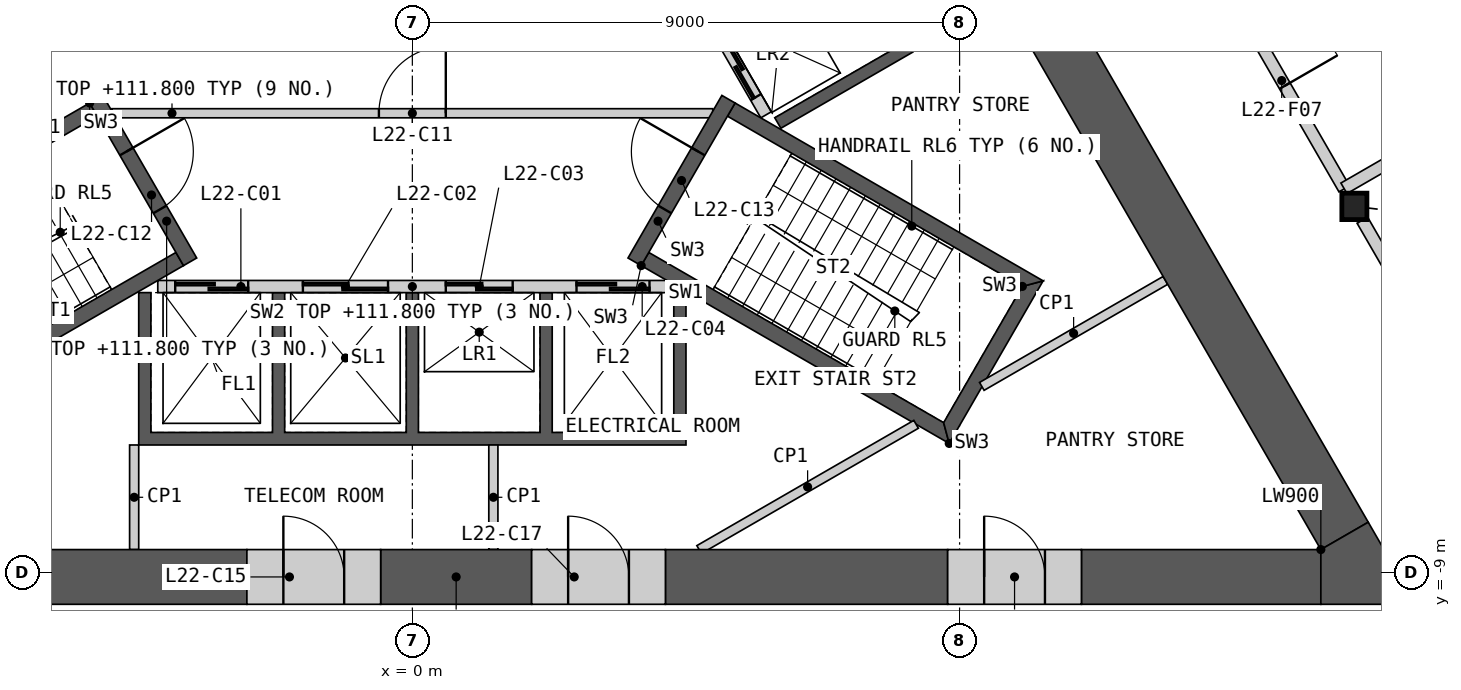
"""IFC4 building model, lengths in metres.
Left out: names, types, materials, properties, quantities, classifications, styles, units other than length and angle.
Written with IfcOpenShell. Run it as: python <this file> out.ifc"""

import sys

from ifc_helpers import new_model, si_unit, direction, frame, frame_2d, origin, origin_2d, place, context, subcontext, project, spatial, polyline, rectangle, i_section, outline, extrude, element, fill, save


model = new_model("IFC4")
c1 = context("Model", 3, precision=1e-05, world=origin(), true_north=direction((0.0, 1.0)))
c2 = subcontext(c1, "Body", "Model", "MODEL_VIEW")
j1 = project(units=[si_unit("LENGTHUNIT", "METRE"), si_unit("PLANEANGLEUNIT", "RADIAN")], contexts=[c1])
p1 = place(None, origin())
s1 = spatial("IfcSite", under=j1, at=p1, CompositionType="ELEMENT")
p2 = place(p1, origin())
s2 = spatial("IfcBuilding", under=s1, at=p2, CompositionType="ELEMENT")
p3 = place(p2, frame((0.0, 0.0, 108.0)))
s3 = spatial("IfcBuildingStorey", under=s2, at=p3, CompositionType="ELEMENT", Elevation=108.0)
p4 = place(p3, frame((15.493, -2.982, 0.0), z_axis=(0.0, 0.0, 1.0), x_axis=(1.0, 0.0, 0.0)))
e1 = element("IfcColumn", 1, at=p4, inside=s3, PredefinedType="COLUMN", context=c2, shape_type="SweptSolid", body=[
    extrude(i_section(OverallWidth=0.412, OverallDepth=0.435, WebThickness=0.036, FlangeThickness=0.057, at=origin_2d()), origin(), (0.0, 0.0, 1.0), 4.2),
])
p5 = place(p3, origin())
e2 = element("IfcWall", 2, at=p5, inside=s3, PredefinedType="SHEAR", context=c2, shape_type="SweptSolid", body=[
    extrude(outline(polyline([(4.5, -4.4), (4.5, -6.906), (-4.5, -6.906), (-4.5, -4.4), (-4.3, -4.4), (-4.3, -6.7), (-2.3, -6.7), (-2.3, -4.4), (-2.1, -4.4), (-2.1, -6.7), (-0.1, -6.7), (-0.1, -4.4), (0.1, -4.4), (0.1, -6.7), (2.1, -6.7), (2.1, -4.4), (2.3, -4.4), (2.3, -6.7), (4.3, -6.7), (4.3, -4.4), (4.5, -4.4)])), origin(), (0.0, 0.0, 1.0), 3.8),
])
p6 = place(p3, frame((-4.187, -4.3, 0.0), z_axis=(0.0, 0.0, 1.0), x_axis=(1.0, 0.0, 0.0)))
e3 = element("IfcWall", 3, at=p6, inside=s3, PredefinedType="SOLIDWALL", context=c2, shape_type="SweptSolid", body=[
    extrude(rectangle(XDim=8.373, YDim=0.2, at=frame_2d((4.187, 0.0))), origin(), (0.0, 0.0, 1.0), 3.8),
])
p7 = place(p6, frame((0.287, 0.0, 0.0)))
e4 = element("IfcOpeningElement", 4, at=p7, cuts=e3, PredefinedType="OPENING", context=c2, shape_type="SweptSolid", body=[
    extrude(rectangle(XDim=1.2, YDim=2.1, at=frame_2d((0.6, 1.05))), frame((0.0, 0.11, 0.0), z_axis=(0.0, -1.0, 0.0), x_axis=(1.0, 0.0, 0.0)), (0.0, 0.0, 1.0), 0.22),
])
p8 = place(p6, frame((2.387, 0.0, 0.0)))
e5 = element("IfcOpeningElement", 5, at=p8, cuts=e3, PredefinedType="OPENING", context=c2, shape_type="SweptSolid", body=[
    extrude(rectangle(XDim=1.4, YDim=2.1, at=frame_2d((0.7, 1.05))), frame((0.0, 0.11, 0.0), z_axis=(0.0, -1.0, 0.0), x_axis=(1.0, 0.0, 0.0)), (0.0, 0.0, 1.0), 0.22),
])
p9 = place(p6, frame((4.737, 0.0, 0.0)))
e6 = element("IfcOpeningElement", 6, at=p9, cuts=e3, PredefinedType="OPENING", context=c2, shape_type="SweptSolid", body=[
    extrude(rectangle(XDim=1.1, YDim=2.1, at=frame_2d((0.55, 1.05))), frame((0.0, 0.11, 0.0), z_axis=(0.0, -1.0, 0.0), x_axis=(1.0, 0.0, 0.0)), (0.0, 0.0, 1.0), 0.22),
])
p10 = place(p6, frame((6.887, 0.0, 0.0)))
e7 = element("IfcOpeningElement", 7, at=p10, cuts=e3, PredefinedType="OPENING", context=c2, shape_type="SweptSolid", body=[
    extrude(rectangle(XDim=1.2, YDim=2.1, at=frame_2d((0.6, 1.05))), frame((0.0, 0.11, 0.0), z_axis=(0.0, -1.0, 0.0), x_axis=(1.0, 0.0, 0.0)), (0.0, 0.0, 1.0), 0.22),
])
p11 = place(p3, origin())
e8 = element("IfcWall", 8, at=p11, inside=s3, PredefinedType="SHEAR", context=c2, shape_type="SweptSolid", body=[
    extrude(outline(polyline([(2.66, 4.192), (4.831, 5.445), (8.231, -0.444), (6.061, -1.697), (5.96, -1.524), (7.952, -0.374), (6.952, 1.358), (4.96, 0.208), (4.861, 0.381), (6.852, 1.531), (5.852, 3.263), (3.861, 2.113), (3.76, 2.287), (5.752, 3.437), (4.752, 5.169), (2.76, 4.019), (2.66, 4.192)])), origin(), (0.0, 0.0, 1.0), 3.8),
])
p12 = place(p3, frame((5.817, -1.476, 0.0), z_axis=(0.0, 0.0, 1.0), x_axis=(-0.500002616675, 0.866023893041, 0.0)))
e9 = element("IfcWall", 9, at=p12, inside=s3, PredefinedType="SOLIDWALL", context=c2, shape_type="SweptSolid", body=[
    extrude(rectangle(XDim=8.373, YDim=0.2, at=frame_2d((4.187, 0.0))), origin(), (0.0, 0.0, 1.0), 3.8),
])
p13 = place(p12, frame((0.337, 0.0, 0.0)))
e10 = element("IfcOpeningElement", 10, at=p13, cuts=e9, PredefinedType="OPENING", context=c2, shape_type="SweptSolid", body=[
    extrude(rectangle(XDim=1.1, YDim=2.1, at=frame_2d((0.55, 1.05))), frame((0.0, 0.11, 0.0), z_axis=(0.0, -1.0, 0.0), x_axis=(1.0, 0.0, 0.0)), (0.0, 0.0, 1.0), 0.22),
])
p14 = place(p12, frame((2.537, 0.0, 0.0)))
e11 = element("IfcOpeningElement", 11, at=p14, cuts=e9, PredefinedType="OPENING", context=c2, shape_type="SweptSolid", body=[
    extrude(rectangle(XDim=1.1, YDim=2.1, at=frame_2d((0.55, 1.05))), frame((0.0, 0.11, 0.0), z_axis=(0.0, -1.0, 0.0), x_axis=(1.0, 0.0, 0.0)), (0.0, 0.0, 1.0), 0.22),
])
p15 = place(p12, frame((4.737, 0.0, 0.0)))
e12 = element("IfcOpeningElement", 12, at=p15, cuts=e9, PredefinedType="OPENING", context=c2, shape_type="SweptSolid", body=[
    extrude(rectangle(XDim=1.1, YDim=2.1, at=frame_2d((0.55, 1.05))), frame((0.0, 0.11, 0.0), z_axis=(0.0, -1.0, 0.0), x_axis=(1.0, 0.0, 0.0)), (0.0, 0.0, 1.0), 0.22),
])
p16 = place(p12, frame((7.037, 0.0, 0.0)))
e13 = element("IfcOpeningElement", 13, at=p16, cuts=e9, PredefinedType="OPENING", context=c2, shape_type="SweptSolid", body=[
    extrude(rectangle(XDim=0.9, YDim=2.1, at=frame_2d((0.45, 1.05))), frame((0.0, 0.11, 0.0), z_axis=(0.0, -1.0, 0.0), x_axis=(1.0, 0.0, 0.0)), (0.0, 0.0, 1.0), 0.22),
])
p17 = place(p3, frame((-4.941, -1.45, 0.0), z_axis=(0.0, 0.0, 1.0), x_axis=(1.0, 0.0, 0.0)))
e14 = element("IfcWall", 14, at=p17, inside=s3, PredefinedType="PARTITIONING", context=c2, shape_type="SweptSolid", body=[
    extrude(rectangle(XDim=9.882, YDim=0.15, at=frame_2d((4.941, 0.0))), origin(), (0.0, 0.0, 1.0), 3.8),
])
p18 = place(p17, frame((4.391, 0.0, 0.0)))
e15 = element("IfcOpeningElement", 15, at=p18, cuts=e14, PredefinedType="OPENING", context=c2, shape_type="SweptSolid", body=[
    extrude(rectangle(XDim=1.1, YDim=2.1, at=frame_2d((0.55, 1.05))), frame((0.0, 0.085, 0.0), z_axis=(0.0, -1.0, 0.0), x_axis=(1.0, 0.0, 0.0)), (0.0, 0.0, 1.0), 0.17),
])
p19 = place(p3, origin())
e16 = element("IfcWall", 16, at=p19, inside=s3, PredefinedType="SHEAR", context=c2, shape_type="SweptSolid", body=[
    extrude(outline(polyline([(-5.307, -1.281), (-10.374, -4.206), (-10.032, -4.298), (-5.182, -1.498), (-5.307, -1.281)])), origin(), (0.0, 0.0, 1.0), 3.8),
])
p20 = place(p3, origin())
e17 = element("IfcWall", 17, at=p20, inside=s3, PredefinedType="SHEAR", context=c2, shape_type="SweptSolid", body=[
    extrude(outline(polyline([(-8.738, -6.539), (-8.83, -6.881), (-3.763, -3.956), (-3.888, -3.739), (-8.738, -6.539)])), origin(), (0.0, 0.0, 1.0), 3.8),
])
p21 = place(p3, frame((-5.199, -1.219, 0.0), z_axis=(0.0, 0.0, 1.0), x_axis=(0.499982516597, -0.866035497597, 0.0)))
e18 = element("IfcWall", 18, at=p21, inside=s3, PredefinedType="SHEAR", context=c2, shape_type="SweptSolid", body=[
    extrude(rectangle(XDim=3.088, YDim=0.25, at=frame_2d((1.544, 0.0))), origin(), (0.0, 0.0, 1.0), 3.8),
])
p22 = place(p21, frame((0.994, 0.0, 0.0)))
e19 = element("IfcOpeningElement", 19, at=p22, cuts=e18, PredefinedType="OPENING", context=c2, shape_type="SweptSolid", body=[
    extrude(rectangle(XDim=1.1, YDim=2.1, at=frame_2d((0.55, 1.05))), frame((0.0, 0.135, 0.0), z_axis=(0.0, -1.0, 0.0), x_axis=(1.0, 0.0, 0.0)), (0.0, 0.0, 1.0), 0.27),
])
p23 = place(p3, origin())
e20 = element("IfcWall", 20, at=p23, inside=s3, PredefinedType="SHEAR", context=c2, shape_type="SweptSolid", body=[
    extrude(outline(polyline([(3.763, -3.956), (8.83, -6.881), (8.738, -6.539), (3.888, -3.739), (3.763, -3.956)])), origin(), (0.0, 0.0, 1.0), 3.8),
])
p24 = place(p3, origin())
e21 = element("IfcWall", 21, at=p24, inside=s3, PredefinedType="SHEAR", context=c2, shape_type="SweptSolid", body=[
    extrude(outline(polyline([(8.83, -6.881), (10.374, -4.206), (10.032, -4.298), (8.738, -6.539), (8.83, -6.881)])), origin(), (0.0, 0.0, 1.0), 3.8),
])
p25 = place(p3, origin())
e22 = element("IfcWall", 22, at=p25, inside=s3, PredefinedType="SHEAR", context=c2, shape_type="SweptSolid", body=[
    extrude(outline(polyline([(10.032, -4.298), (10.374, -4.206), (5.307, -1.281), (5.182, -1.498), (10.032, -4.298)])), origin(), (0.0, 0.0, 1.0), 3.8),
])
p26 = place(p3, frame((3.655, -3.893, 0.0), z_axis=(0.0, 0.0, 1.0), x_axis=(0.499982516597, 0.866035497597, 0.0)))
e23 = element("IfcWall", 23, at=p26, inside=s3, PredefinedType="SHEAR", context=c2, shape_type="SweptSolid", body=[
    extrude(rectangle(XDim=3.088, YDim=0.25, at=frame_2d((1.544, 0.0))), origin(), (0.0, 0.0, 1.0), 3.8),
])
p27 = place(p26, frame((0.994, 0.0, 0.0)))
e24 = element("IfcOpeningElement", 24, at=p27, cuts=e23, PredefinedType="OPENING", context=c2, shape_type="SweptSolid", body=[
    extrude(rectangle(XDim=1.1, YDim=2.1, at=frame_2d((0.55, 1.05))), frame((0.0, 0.135, 0.0), z_axis=(0.0, -1.0, 0.0), x_axis=(1.0, 0.0, 0.0)), (0.0, 0.0, 1.0), 0.27),
])
for number, where, z_axis, x_axis in (
    (25, (-4.575, -6.906, 0.0), (0.0, 0.0, 1.0), (0.0, -1.0, 0.0)),
    (26, (1.333, -8.626, 0.0), (0.0, 0.0, 1.0), (0.0, 1.0, 0.0)),
):
    element("IfcWall", number, at=place(p3, frame(where, z_axis=z_axis, x_axis=x_axis)), inside=s3, PredefinedType="PARTITIONING", context=c2, shape_type="SweptSolid", body=[
        extrude(rectangle(XDim=1.72, YDim=0.15, at=frame_2d((0.86, 0.0))), origin(), (0.0, 0.0, 1.0), 3.8),
    ])
p28 = place(p3, frame((8.285, -6.566, 0.0), z_axis=(0.0, 0.0, 1.0), x_axis=(-0.866039554287, -0.49997548981, 0.0)))
e27 = element("IfcWall", 27, at=p28, inside=s3, PredefinedType="PARTITIONING", context=c2, shape_type="SweptSolid", body=[
    extrude(rectangle(XDim=4.12, YDim=0.15, at=frame_2d((2.06, 0.0))), origin(), (0.0, 0.0, 1.0), 3.8),
])
p29 = place(p3, frame((12.385, -4.199, 0.0), z_axis=(0.0, 0.0, 1.0), x_axis=(-0.86604566135, -0.499964911226, 0.0)))
e28 = element("IfcWall", 28, at=p29, inside=s3, PredefinedType="PARTITIONING", context=c2, shape_type="SweptSolid", body=[
    extrude(rectangle(XDim=3.487, YDim=0.15, at=frame_2d((1.743, 0.0))), origin(), (0.0, 0.0, 1.0), 3.8),
])
p30 = place(p3, frame((4.162, -9.076, 0.0), z_axis=(0.0, 0.0, 1.0), x_axis=(1.0, 0.0, 0.0)))
e29 = element("IfcWall", 29, at=p30, inside=s3, PredefinedType="SHEAR", context=c2, shape_type="SweptSolid", body=[
    extrude(rectangle(XDim=4.642, YDim=0.9, at=frame_2d((2.321, 0.0))), origin(), (0.0, 0.0, 1.0), 3.8),
])
p31 = place(p3, frame((-7.115, -9.076, 0.0), z_axis=(0.0, 0.0, 1.0), x_axis=(1.0, 0.0, 0.0)))
e30 = element("IfcWall", 30, at=p31, inside=s3, PredefinedType="SHEAR", context=c2, shape_type="SweptSolid", body=[
    extrude(rectangle(XDim=4.393, YDim=0.9, at=frame_2d((2.197, 0.0))), origin(), (0.0, 0.0, 1.0), 3.8),
])
p32 = place(p3, frame((11.004, -9.076, 0.0), z_axis=(0.0, 0.0, 1.0), x_axis=(1.0, 0.0, 0.0)))
e31 = element("IfcWall", 31, at=p32, inside=s3, PredefinedType="SHEAR", context=c2, shape_type="SweptSolid", body=[
    extrude(rectangle(XDim=3.937, YDim=0.9, at=frame_2d((1.969, 0.0))), origin(), (0.0, 0.0, 1.0), 3.8),
])
p33 = place(p3, frame((-0.521, -9.076, 0.0), z_axis=(0.0, 0.0, 1.0), x_axis=(1.0, 0.0, 0.0)))
e32 = element("IfcWall", 32, at=p33, inside=s3, PredefinedType="SHEAR", context=c2, shape_type="SweptSolid", body=[
    extrude(rectangle(XDim=2.483, YDim=0.9, at=frame_2d((1.242, 0.0))), origin(), (0.0, 0.0, 1.0), 3.8),
])
p34 = place(p3, frame((15.331, -8.401, 0.0), z_axis=(0.0, 0.0, 1.0), x_axis=(-0.499996094196, 0.86602765879, 0.0)))
e33 = element("IfcWall", 33, at=p34, inside=s3, PredefinedType="SHEAR", context=c2, shape_type="SweptSolid", body=[
    extrude(rectangle(XDim=10.014, YDim=0.9, at=frame_2d((5.007, 0.0))), origin(), (0.0, 0.0, 1.0), 3.8),
])
p35 = place(p3, origin())
e34 = element("IfcWall", 34, at=p35, inside=s3, PredefinedType="SHEAR", context=c2, shape_type="SweptSolid", body=[
    extrude(outline(polyline([(14.941, -8.626), (15.721, -8.176), (16.5, -9.526), (14.941, -9.526), (14.941, -8.626)])), origin(), (0.0, 0.0, 1.0), 3.8),
])
p36 = place(p3, frame((-2.721, -9.076, 0.0), z_axis=(0.0, 0.0, 1.0), x_axis=(1.0, 0.0, 0.0)))
e35 = element("IfcWall", 35, at=p36, inside=s3, PredefinedType="SHEAR", context=c2, shape_type="SweptSolid", body=[
    extrude(rectangle(XDim=2.2, YDim=0.9, at=frame_2d((1.1, 0.0))), origin(), (0.0, 0.0, 1.0), 3.8),
])
p37 = place(p36, frame((0.6, 0.0, 0.0)))
e36 = element("IfcOpeningElement", 36, at=p37, cuts=e35, PredefinedType="OPENING", context=c2, shape_type="SweptSolid", body=[
    extrude(rectangle(XDim=1.0, YDim=2.1, at=frame_2d((0.5, 1.05))), frame((0.0, 0.46, 0.0), z_axis=(0.0, -1.0, 0.0), x_axis=(1.0, 0.0, 0.0)), (0.0, 0.0, 1.0), 0.92),
])
p38 = place(p3, frame((8.804, -9.076, 0.0), z_axis=(0.0, 0.0, 1.0), x_axis=(1.0, 0.0, 0.0)))
e37 = element("IfcWall", 37, at=p38, inside=s3, PredefinedType="SHEAR", context=c2, shape_type="SweptSolid", body=[
    extrude(rectangle(XDim=2.2, YDim=0.9, at=frame_2d((1.1, 0.0))), origin(), (0.0, 0.0, 1.0), 3.8),
])
p39 = place(p38, frame((0.6, 0.0, 0.0)))
e38 = element("IfcOpeningElement", 38, at=p39, cuts=e37, PredefinedType="OPENING", context=c2, shape_type="SweptSolid", body=[
    extrude(rectangle(XDim=1.0, YDim=2.1, at=frame_2d((0.5, 1.05))), frame((0.0, 0.46, 0.0), z_axis=(0.0, -1.0, 0.0), x_axis=(1.0, 0.0, 0.0)), (0.0, 0.0, 1.0), 0.92),
])
p40 = place(p3, frame((1.962, -9.076, 0.0), z_axis=(0.0, 0.0, 1.0), x_axis=(1.0, 0.0, 0.0)))
e39 = element("IfcWall", 39, at=p40, inside=s3, PredefinedType="SHEAR", context=c2, shape_type="SweptSolid", body=[
    extrude(rectangle(XDim=2.2, YDim=0.9, at=frame_2d((1.1, 0.0))), origin(), (0.0, 0.0, 1.0), 3.8),
])
p41 = place(p40, frame((0.6, 0.0, 0.0)))
e40 = element("IfcOpeningElement", 40, at=p41, cuts=e39, PredefinedType="OPENING", context=c2, shape_type="SweptSolid", body=[
    extrude(rectangle(XDim=1.0, YDim=2.1, at=frame_2d((0.5, 1.05))), frame((0.0, 0.46, 0.0), z_axis=(0.0, -1.0, 0.0), x_axis=(1.0, 0.0, 0.0)), (0.0, 0.0, 1.0), 0.92),
])
p42 = place(p3, frame((10.46, 5.736, 0.0), z_axis=(0.0, 0.0, 1.0), x_axis=(0.500010522431, -0.866019328571, 0.0)))
e41 = element("IfcWall", 41, at=p42, inside=s3, PredefinedType="PARTITIONING", context=c2, shape_type="SweptSolid", body=[
    extrude(rectangle(XDim=9.733, YDim=0.2, at=frame_2d((4.866, 0.0))), origin(), (0.0, 0.0, 1.0), 3.8),
])
p43 = place(p42, frame((6.776, 0.0, 0.0)))
e42 = element("IfcOpeningElement", 42, at=p43, cuts=e41, PredefinedType="OPENING", context=c2, shape_type="SweptSolid", body=[
    extrude(rectangle(XDim=1.0, YDim=2.1, at=frame_2d((0.5, 1.05))), frame((0.0, 0.11, 0.0), z_axis=(0.0, -1.0, 0.0), x_axis=(1.0, 0.0, 0.0)), (0.0, 0.0, 1.0), 0.22),
])
p44 = place(p42, frame((1.856, 0.0, 0.0)))
e43 = element("IfcOpeningElement", 43, at=p44, cuts=e41, PredefinedType="OPENING", context=c2, shape_type="SweptSolid", body=[
    extrude(rectangle(XDim=1.0, YDim=2.1, at=frame_2d((0.5, 1.05))), frame((0.0, 0.11, 0.0), z_axis=(0.0, -1.0, 0.0), x_axis=(1.0, 0.0, 0.0)), (0.0, 0.0, 1.0), 0.22),
])
p45 = place(p3, frame((15.624, -3.209, 0.0), z_axis=(0.0, 0.0, 1.0), x_axis=(0.499997920671, -0.866026604282, 0.0)))
e44 = element("IfcWall", 44, at=p45, inside=s3, PredefinedType="PARTITIONING", context=c2, shape_type="SweptSolid", body=[
    extrude(rectangle(XDim=6.24, YDim=0.2, at=frame_2d((3.12, 0.0))), origin(), (0.0, 0.0, 1.0), 3.8),
])
p46 = place(p45, frame((2.57, 0.0, 0.0)))
e45 = element("IfcOpeningElement", 45, at=p46, cuts=e44, PredefinedType="OPENING", context=c2, shape_type="SweptSolid", body=[
    extrude(rectangle(XDim=1.0, YDim=2.1, at=frame_2d((0.5, 1.05))), frame((0.0, 0.11, 0.0), z_axis=(0.0, -1.0, 0.0), x_axis=(1.0, 0.0, 0.0)), (0.0, 0.0, 1.0), 0.22),
])
p47 = place(p3, frame((15.321, -2.684, 0.0), z_axis=(0.0, 0.0, 1.0), x_axis=(0.866029068465, 0.499993652534, 0.0)))
e46 = element("IfcWall", 46, at=p47, inside=s3, PredefinedType="PARTITIONING", context=c2, shape_type="SweptSolid", body=[
    extrude(rectangle(XDim=13.066, YDim=0.2, at=frame_2d((6.533, 0.0))), origin(), (0.0, 0.0, 1.0), 2.885),
])
p48 = place(p7, origin())
e47 = element("IfcDoor", 47, at=p48, inside=s3, OperationType="SLIDING_TO_LEFT", PredefinedType="DOOR", context=c2, shape_type="SweptSolid", body=[
    extrude(rectangle(XDim=1.2, YDim=2.1, at=frame_2d((0.6, 1.05))), frame((0.0, 0.025, 0.0), z_axis=(0.0, -1.0, 0.0), x_axis=(1.0, 0.0, 0.0)), (0.0, 0.0, 1.0), 0.05),
])
fill(e4, e47)
p49 = place(p8, origin())
e48 = element("IfcDoor", 48, at=p49, inside=s3, OperationType="SLIDING_TO_LEFT", PredefinedType="DOOR", context=c2, shape_type="SweptSolid", body=[
    extrude(rectangle(XDim=1.4, YDim=2.1, at=frame_2d((0.7, 1.05))), frame((0.0, 0.025, 0.0), z_axis=(0.0, -1.0, 0.0), x_axis=(1.0, 0.0, 0.0)), (0.0, 0.0, 1.0), 0.05),
])
fill(e5, e48)
p50 = place(p9, origin())
e49 = element("IfcDoor", 49, at=p50, inside=s3, OperationType="SLIDING_TO_LEFT", PredefinedType="DOOR", context=c2, shape_type="SweptSolid", body=[
    extrude(rectangle(XDim=1.1, YDim=2.1, at=frame_2d((0.55, 1.05))), frame((0.0, 0.025, 0.0), z_axis=(0.0, -1.0, 0.0), x_axis=(1.0, 0.0, 0.0)), (0.0, 0.0, 1.0), 0.05),
])
fill(e6, e49)
p51 = place(p10, origin())
e50 = element("IfcDoor", 50, at=p51, inside=s3, OperationType="SLIDING_TO_LEFT", PredefinedType="DOOR", context=c2, shape_type="SweptSolid", body=[
    extrude(rectangle(XDim=1.2, YDim=2.1, at=frame_2d((0.6, 1.05))), frame((0.0, 0.025, 0.0), z_axis=(0.0, -1.0, 0.0), x_axis=(1.0, 0.0, 0.0)), (0.0, 0.0, 1.0), 0.05),
])
fill(e7, e50)
p52 = place(p13, origin())
e51 = element("IfcDoor", 51, at=p52, inside=s3, OperationType="SLIDING_TO_LEFT", PredefinedType="DOOR", context=c2, shape_type="SweptSolid", body=[
    extrude(rectangle(XDim=1.1, YDim=2.1, at=frame_2d((0.55, 1.05))), frame((0.0, 0.025, 0.0), z_axis=(0.0, -1.0, 0.0), x_axis=(1.0, 0.0, 0.0)), (0.0, 0.0, 1.0), 0.05),
])
fill(e10, e51)
p53 = place(p18, origin())
e52 = element("IfcDoor", 52, at=p53, inside=s3, OperationType="SINGLE_SWING_RIGHT", PredefinedType="DOOR", context=c2, shape_type="SweptSolid", body=[
    extrude(rectangle(XDim=1.1, YDim=2.1, at=frame_2d((0.55, 1.05))), frame((0.0, 0.025, 0.0), z_axis=(0.0, -1.0, 0.0), x_axis=(1.0, 0.0, 0.0)), (0.0, 0.0, 1.0), 0.05),
])
fill(e15, e52)
p54 = place(p22, origin())
e53 = element("IfcDoor", 53, at=p54, inside=s3, OperationType="SINGLE_SWING_LEFT", PredefinedType="DOOR", context=c2, shape_type="SweptSolid", body=[
    extrude(rectangle(XDim=1.1, YDim=2.1, at=frame_2d((0.55, 1.05))), frame((0.0, 0.025, 0.0), z_axis=(0.0, -1.0, 0.0), x_axis=(1.0, 0.0, 0.0)), (0.0, 0.0, 1.0), 0.05),
])
fill(e19, e53)
p55 = place(p27, origin())
e54 = element("IfcDoor", 54, at=p55, inside=s3, OperationType="SINGLE_SWING_RIGHT", PredefinedType="DOOR", context=c2, shape_type="SweptSolid", body=[
    extrude(rectangle(XDim=1.1, YDim=2.1, at=frame_2d((0.55, 1.05))), frame((0.0, 0.025, 0.0), z_axis=(0.0, -1.0, 0.0), x_axis=(1.0, 0.0, 0.0)), (0.0, 0.0, 1.0), 0.05),
])
fill(e24, e54)
p56 = place(p37, origin())
e55 = element("IfcDoor", 55, at=p56, inside=s3, OperationType="SINGLE_SWING_LEFT", PredefinedType="DOOR", context=c2, shape_type="SweptSolid", body=[
    extrude(rectangle(XDim=1.0, YDim=2.1, at=frame_2d((0.5, 1.05))), frame((0.0, 0.205, 0.0), z_axis=(0.0, -1.0, 0.0), x_axis=(1.0, 0.0, 0.0)), (0.0, 0.0, 1.0), 0.05),
])
fill(e36, e55)
p57 = place(p39, origin())
e56 = element("IfcDoor", 56, at=p57, inside=s3, OperationType="SINGLE_SWING_LEFT", PredefinedType="DOOR", context=c2, shape_type="SweptSolid", body=[
    extrude(rectangle(XDim=1.0, YDim=2.1, at=frame_2d((0.5, 1.05))), frame((0.0, 0.205, 0.0), z_axis=(0.0, -1.0, 0.0), x_axis=(1.0, 0.0, 0.0)), (0.0, 0.0, 1.0), 0.05),
])
fill(e38, e56)
p58 = place(p41, origin())
e57 = element("IfcDoor", 57, at=p58, inside=s3, OperationType="SINGLE_SWING_LEFT", PredefinedType="DOOR", context=c2, shape_type="SweptSolid", body=[
    extrude(rectangle(XDim=1.0, YDim=2.1, at=frame_2d((0.5, 1.05))), frame((0.0, 0.205, 0.0), z_axis=(0.0, -1.0, 0.0), x_axis=(1.0, 0.0, 0.0)), (0.0, 0.0, 1.0), 0.05),
])
fill(e40, e57)
p59 = place(p43, origin())
e58 = element("IfcDoor", 58, at=p59, inside=s3, OperationType="SINGLE_SWING_RIGHT", PredefinedType="DOOR", context=c2, shape_type="SweptSolid", body=[
    extrude(rectangle(XDim=1.0, YDim=2.1, at=frame_2d((0.5, 1.05))), frame((0.0, 0.025, 0.0), z_axis=(0.0, -1.0, 0.0), x_axis=(1.0, 0.0, 0.0)), (0.0, 0.0, 1.0), 0.05),
])
fill(e42, e58)
save(model, sys.argv[1])
